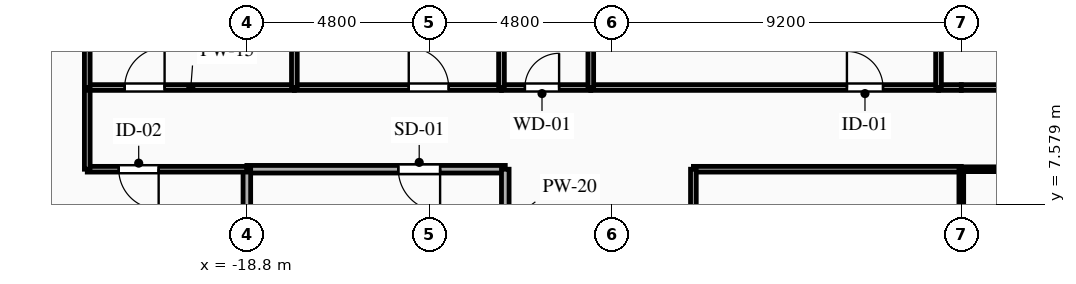
"""IFC4 building model, lengths in metres.
Left out: names, types, materials, properties, quantities, classifications, styles, units other than length and angle.
Written with IfcOpenShell. Run it as: python <this file> out.ifc"""

import sys

from ifc_helpers import new_model, si_unit, direction, frame, frame_2d, origin, place, context, subcontext, project, spatial, rectangle, extrude, element, fill, save


model = new_model("IFC4")
c1 = context("Model", 3, precision=1e-05, world=origin(), true_north=direction((0.0, 1.0)))
c2 = subcontext(c1, "Body", "Model", "MODEL_VIEW")
j1 = project(units=[si_unit("LENGTHUNIT", "METRE"), si_unit("PLANEANGLEUNIT", "RADIAN")], contexts=[c1])
p1 = place(None, origin())
s1 = spatial("IfcSite", under=j1, at=p1, CompositionType="ELEMENT")
p2 = place(p1, origin())
s2 = spatial("IfcBuilding", under=s1, at=p2, CompositionType="ELEMENT")
p3 = place(p2, frame((0.0, 0.0, 70.55)))
s3 = spatial("IfcBuildingStorey", under=s2, at=p3, CompositionType="ELEMENT", Elevation=70.55)
p4 = place(p3, frame((-12.0, 8.5, 0.0), z_axis=(0.0, 0.0, 1.0), x_axis=(-1.0, 0.0, 0.0)))
e1 = element("IfcWall", 1, at=p4, inside=s3, PredefinedType="PARTITIONING", context=c2, shape_type="SweptSolid", body=[
    extrude(rectangle(XDim=6.8, YDim=0.2, at=frame_2d((3.4, 0.0))), origin(), (0.0, 0.0, 1.0), 3.0),
])
p5 = place(p4, frame((1.715, 0.0, 0.0)))
e2 = element("IfcOpeningElement", 2, at=p5, cuts=e1, PredefinedType="OPENING", context=c2, shape_type="SweptSolid", body=[
    extrude(rectangle(XDim=1.1, YDim=2.15, at=frame_2d((0.55, 1.075))), frame((0.0, 0.11, 0.0), z_axis=(0.0, -1.0, 0.0), x_axis=(1.0, 0.0, 0.0)), (0.0, 0.0, 1.0), 0.22),
])
p6 = place(p3, frame((-12.0, 5.6, 0.0), z_axis=(0.0, 0.0, 1.0), x_axis=(0.0, 1.0, 0.0)))
e3 = element("IfcWall", 3, at=p6, inside=s3, PredefinedType="PARTITIONING", context=c2, shape_type="SweptSolid", body=[
    extrude(rectangle(XDim=2.9, YDim=0.2, at=frame_2d((1.45, 0.0))), origin(), (0.0, 0.0, 1.0), 3.0),
])
p7 = place(p3, frame((-18.8, 8.5, 0.0), z_axis=(0.0, 0.0, 1.0), x_axis=(0.0, -1.0, 0.0)))
e4 = element("IfcWall", 4, at=p7, inside=s3, PredefinedType="PARTITIONING", context=c2, shape_type="SweptSolid", body=[
    extrude(rectangle(XDim=2.173, YDim=0.2, at=frame_2d((1.086, 0.0))), origin(), (0.0, 0.0, 1.0), 2.485),
])
p8 = place(p3, frame((-18.8, 8.5, 0.0), z_axis=(0.0, 0.0, 1.0), x_axis=(-1.0, 0.0, 0.0)))
e5 = element("IfcWall", 5, at=p8, inside=s3, PredefinedType="PARTITIONING", context=c2, shape_type="SweptSolid", body=[
    extrude(rectangle(XDim=4.2, YDim=0.15, at=frame_2d((2.1, 0.0))), origin(), (0.0, 0.0, 1.0), 3.0),
])
p9 = place(p8, frame((2.321, 0.0, 0.0)))
e6 = element("IfcOpeningElement", 6, at=p9, cuts=e5, PredefinedType="OPENING", context=c2, shape_type="SweptSolid", body=[
    extrude(rectangle(XDim=1.05, YDim=2.15, at=frame_2d((0.525, 1.075))), frame((0.0, 0.085, 0.0), z_axis=(0.0, -1.0, 0.0), x_axis=(1.0, 0.0, 0.0)), (0.0, 0.0, 1.0), 0.17),
])
p10 = place(p3, frame((-23.0, 8.5, 0.0), z_axis=(0.0, 0.0, 1.0), x_axis=(0.0, 1.0, 0.0)))
e7 = element("IfcWall", 7, at=p10, inside=s3, PredefinedType="PARTITIONING", context=c2, shape_type="SweptSolid", body=[
    extrude(rectangle(XDim=2.15, YDim=0.15, at=frame_2d((1.075, 0.0))), origin(), (0.0, 0.0, 1.0), 3.0),
])
p11 = place(p3, frame((-23.0, 10.65, 0.0), z_axis=(0.0, 0.0, 1.0), x_axis=(1.0, 0.0, 0.0)))
e8 = element("IfcWall", 8, at=p11, inside=s3, PredefinedType="PARTITIONING", context=c2, shape_type="SweptSolid", body=[
    extrude(rectangle(XDim=5.45, YDim=0.15, at=frame_2d((2.725, 0.0))), origin(), (0.0, 0.0, 1.0), 3.0),
])
p12 = place(p11, frame((0.985, 0.0, 0.0)))
e9 = element("IfcOpeningElement", 9, at=p12, cuts=e8, PredefinedType="OPENING", context=c2, shape_type="SweptSolid", body=[
    extrude(rectangle(XDim=1.05, YDim=2.15, at=frame_2d((0.525, 1.075))), frame((0.0, 0.085, 0.0), z_axis=(0.0, -1.0, 0.0), x_axis=(1.0, 0.0, 0.0)), (0.0, 0.0, 1.0), 0.17),
])
p13 = place(p3, frame((-17.55, 10.65, 0.0), z_axis=(0.0, 0.0, 1.0), x_axis=(1.0, 0.0, 0.0)))
e10 = element("IfcWall", 10, at=p13, inside=s3, PredefinedType="PARTITIONING", context=c2, shape_type="SweptSolid", body=[
    extrude(rectangle(XDim=5.45, YDim=0.15, at=frame_2d((2.725, 0.0))), origin(), (0.0, 0.0, 1.0), 3.0),
])
p14 = place(p13, frame((3.01, 0.0, 0.0)))
e11 = element("IfcOpeningElement", 11, at=p14, cuts=e10, PredefinedType="OPENING", context=c2, shape_type="SweptSolid", body=[
    extrude(rectangle(XDim=1.05, YDim=2.15, at=frame_2d((0.525, 1.075))), frame((0.0, 0.085, 0.0), z_axis=(0.0, -1.0, 0.0), x_axis=(1.0, 0.0, 0.0)), (0.0, 0.0, 1.0), 0.17),
])
p15 = place(p3, frame((-12.1, 10.65, 0.0), z_axis=(0.0, 0.0, 1.0), x_axis=(1.0, 0.0, 0.0)))
e12 = element("IfcWall", 12, at=p15, inside=s3, PredefinedType="PLUMBINGWALL", context=c2, shape_type="SweptSolid", body=[
    extrude(rectangle(XDim=2.35, YDim=0.15, at=frame_2d((1.175, 0.0))), origin(), (0.0, 0.0, 1.0), 3.0),
])
p16 = place(p15, frame((0.616, 0.0, 0.0)))
e13 = element("IfcOpeningElement", 13, at=p16, cuts=e12, PredefinedType="OPENING", context=c2, shape_type="SweptSolid", body=[
    extrude(rectangle(XDim=0.9, YDim=2.1, at=frame_2d((0.45, 1.05))), frame((0.0, 0.085, 0.0), z_axis=(0.0, -1.0, 0.0), x_axis=(1.0, 0.0, 0.0)), (0.0, 0.0, 1.0), 0.17),
])
p17 = place(p3, frame((-9.75, 10.65, 0.0), z_axis=(0.0, 0.0, 1.0), x_axis=(1.0, 0.0, 0.0)))
e14 = element("IfcWall", 14, at=p17, inside=s3, PredefinedType="PARTITIONING", context=c2, shape_type="SweptSolid", body=[
    extrude(rectangle(XDim=9.15, YDim=0.15, at=frame_2d((4.575, 0.0))), origin(), (0.0, 0.0, 1.0), 3.0),
])
p18 = place(p17, frame((6.74, 0.0, 0.0)))
e15 = element("IfcOpeningElement", 15, at=p18, cuts=e14, PredefinedType="OPENING", context=c2, shape_type="SweptSolid", body=[
    extrude(rectangle(XDim=0.95, YDim=2.1, at=frame_2d((0.475, 1.05))), frame((0.0, 0.085, 0.0), z_axis=(0.0, -1.0, 0.0), x_axis=(1.0, 0.0, 0.0)), (0.0, 0.0, 1.0), 0.17),
])
p19 = place(p3, frame((-0.6, 10.65, 0.0), z_axis=(0.0, 0.0, 1.0), x_axis=(1.0, 0.0, 0.0)))
e16 = element("IfcWall", 16, at=p19, inside=s3, PredefinedType="PLUMBINGWALL", context=c2, shape_type="SweptSolid", body=[
    extrude(rectangle(XDim=0.6, YDim=0.15, at=frame_2d((0.3, 0.0))), origin(), (0.0, 0.0, 1.0), 3.0),
])
p20 = place(p3, frame((0.0, 8.5, 0.0), z_axis=(0.0, 0.0, 1.0), x_axis=(-1.0, 0.0, 0.0)))
e17 = element("IfcWall", 17, at=p20, inside=s3, PredefinedType="PARTITIONING", context=c2, shape_type="SweptSolid", body=[
    extrude(rectangle(XDim=7.05, YDim=0.15, at=frame_2d((3.525, 0.0))), origin(), (0.0, 0.0, 1.0), 3.0),
])
p21 = place(p3, frame((0.0, 10.65, 0.0), z_axis=(0.0, 0.0, 1.0), x_axis=(1.0, 0.0, 0.0)))
e18 = element("IfcWall", 18, at=p21, inside=s3, PredefinedType="PLUMBINGWALL", context=c2, shape_type="SweptSolid", body=[
    extrude(rectangle(XDim=1.85, YDim=0.15, at=frame_2d((0.925, 0.0))), origin(), (0.0, 0.0, 1.0), 3.0),
])
p22 = place(p3, frame((7.05, 8.5, 0.0), z_axis=(0.0, 0.0, 1.0), x_axis=(-1.0, 0.0, 0.0)))
e19 = element("IfcWall", 19, at=p22, inside=s3, PredefinedType="PARTITIONING", context=c2, shape_type="SweptSolid", body=[
    extrude(rectangle(XDim=7.05, YDim=0.125, at=frame_2d((3.525, 0.0))), origin(), (0.0, 0.0, 1.0), 3.0),
])
p23 = place(p3, frame((-7.05, 8.5, 0.0), z_axis=(0.0, 0.0, 1.0), x_axis=(0.0, -1.0, 0.0)))
e20 = element("IfcWall", 20, at=p23, inside=s3, PredefinedType="PARTITIONING", context=c2, shape_type="SweptSolid", body=[
    extrude(rectangle(XDim=14.1, YDim=0.15, at=frame_2d((7.05, 0.0))), origin(), (0.0, 0.0, 1.0), 3.0),
])
p24 = place(p23, frame((8.074, 0.0, 0.0)))
e21 = element("IfcOpeningElement", 21, at=p24, cuts=e20, PredefinedType="OPENING", context=c2, shape_type="SweptSolid", body=[
    extrude(rectangle(XDim=0.95, YDim=2.1, at=frame_2d((0.475, 1.05))), frame((0.0, 0.085, 0.0), z_axis=(0.0, -1.0, 0.0), x_axis=(1.0, 0.0, 0.0)), (0.0, 0.0, 1.0), 0.17),
])
for number, where, z_axis, x_axis in (
    (22, (-23.0, 19.4, 0.0), (0.0, 0.0, 1.0), (0.0, -1.0, 0.0)),
    (23, (-17.55, 19.4, 0.0), (0.0, 0.0, 1.0), (0.0, -1.0, 0.0)),
):
    element("IfcWall", number, at=place(p3, frame(where, z_axis=z_axis, x_axis=x_axis)), inside=s3, PredefinedType="PARTITIONING", context=c2, shape_type="SweptSolid", body=[
        extrude(rectangle(XDim=8.75, YDim=0.15, at=frame_2d((4.375, 0.0))), origin(), (0.0, 0.0, 1.0), 3.0),
    ])
for number, where, z_axis, x_axis in (
    (24, (-12.1, 19.4, 0.0), (0.0, 0.0, 1.0), (0.0, -1.0, 0.0)),
    (25, (-9.75, 19.4, 0.0), (0.0, 0.0, 1.0), (0.0, -1.0, 0.0)),
):
    element("IfcWall", number, at=place(p3, frame(where, z_axis=z_axis, x_axis=x_axis)), inside=s3, PredefinedType="PLUMBINGWALL", context=c2, shape_type="SweptSolid", body=[
        extrude(rectangle(XDim=8.75, YDim=0.15, at=frame_2d((4.375, 0.0))), origin(), (0.0, 0.0, 1.0), 3.0),
    ])
p25 = place(p3, frame((-0.6, 12.8, 0.0), z_axis=(0.0, 0.0, 1.0), x_axis=(0.0, -1.0, 0.0)))
e26 = element("IfcWall", 26, at=p25, inside=s3, PredefinedType="PLUMBINGWALL", context=c2, shape_type="SweptSolid", body=[
    extrude(rectangle(XDim=2.15, YDim=0.15, at=frame_2d((1.075, 0.0))), origin(), (0.0, 0.0, 1.0), 3.0),
])
p26 = place(p3, frame((0.0, 8.5, 0.0), z_axis=(0.0, 0.0, 1.0), x_axis=(0.0, -1.0, 0.0)))
e27 = element("IfcWall", 27, at=p26, inside=s3, PredefinedType="PARTITIONING", context=c2, shape_type="SweptSolid", body=[
    extrude(rectangle(XDim=14.1, YDim=0.125, at=frame_2d((7.05, 0.0))), origin(), (0.0, 0.0, 1.0), 3.0),
])
p27 = place(p5, origin())
e28 = element("IfcDoor", 28, at=p27, inside=s3, OperationType="SINGLE_SWING_LEFT", PredefinedType="DOOR", context=c2, shape_type="SweptSolid", body=[
    extrude(rectangle(XDim=1.1, YDim=2.15, at=frame_2d((0.55, 1.075))), frame((0.0, 0.025, 0.0), z_axis=(0.0, -1.0, 0.0), x_axis=(1.0, 0.0, 0.0)), (0.0, 0.0, 1.0), 0.05),
])
fill(e2, e28)
p28 = place(p9, origin())
e29 = element("IfcDoor", 29, at=p28, inside=s3, OperationType="SINGLE_SWING_LEFT", PredefinedType="DOOR", context=c2, shape_type="SweptSolid", body=[
    extrude(rectangle(XDim=1.05, YDim=2.15, at=frame_2d((0.525, 1.075))), frame((0.0, 0.025, 0.0), z_axis=(0.0, -1.0, 0.0), x_axis=(1.0, 0.0, 0.0)), (0.0, 0.0, 1.0), 0.05),
])
fill(e6, e29)
p29 = place(p12, origin())
e30 = element("IfcDoor", 30, at=p29, inside=s3, OperationType="SINGLE_SWING_RIGHT", PredefinedType="DOOR", context=c2, shape_type="SweptSolid", body=[
    extrude(rectangle(XDim=1.05, YDim=2.15, at=frame_2d((0.525, 1.075))), frame((0.0, 0.025, 0.0), z_axis=(0.0, -1.0, 0.0), x_axis=(1.0, 0.0, 0.0)), (0.0, 0.0, 1.0), 0.05),
])
fill(e9, e30)
p30 = place(p14, origin())
e31 = element("IfcDoor", 31, at=p30, inside=s3, OperationType="SINGLE_SWING_LEFT", PredefinedType="DOOR", context=c2, shape_type="SweptSolid", body=[
    extrude(rectangle(XDim=1.05, YDim=2.15, at=frame_2d((0.525, 1.075))), frame((0.0, 0.025, 0.0), z_axis=(0.0, -1.0, 0.0), x_axis=(1.0, 0.0, 0.0)), (0.0, 0.0, 1.0), 0.05),
])
fill(e11, e31)
p31 = place(p16, origin())
e32 = element("IfcDoor", 32, at=p31, inside=s3, OperationType="SINGLE_SWING_RIGHT", PredefinedType="DOOR", context=c2, shape_type="SweptSolid", body=[
    extrude(rectangle(XDim=0.9, YDim=2.1, at=frame_2d((0.45, 1.05))), frame((0.0, 0.025, 0.0), z_axis=(0.0, -1.0, 0.0), x_axis=(1.0, 0.0, 0.0)), (0.0, 0.0, 1.0), 0.05),
])
fill(e13, e32)
p32 = place(p18, origin())
e33 = element("IfcDoor", 33, at=p32, inside=s3, OperationType="SINGLE_SWING_LEFT", PredefinedType="DOOR", context=c2, shape_type="SweptSolid", body=[
    extrude(rectangle(XDim=0.95, YDim=2.1, at=frame_2d((0.475, 1.05))), frame((0.0, 0.025, 0.0), z_axis=(0.0, -1.0, 0.0), x_axis=(1.0, 0.0, 0.0)), (0.0, 0.0, 1.0), 0.05),
])
fill(e15, e33)
save(model, sys.argv[1])
